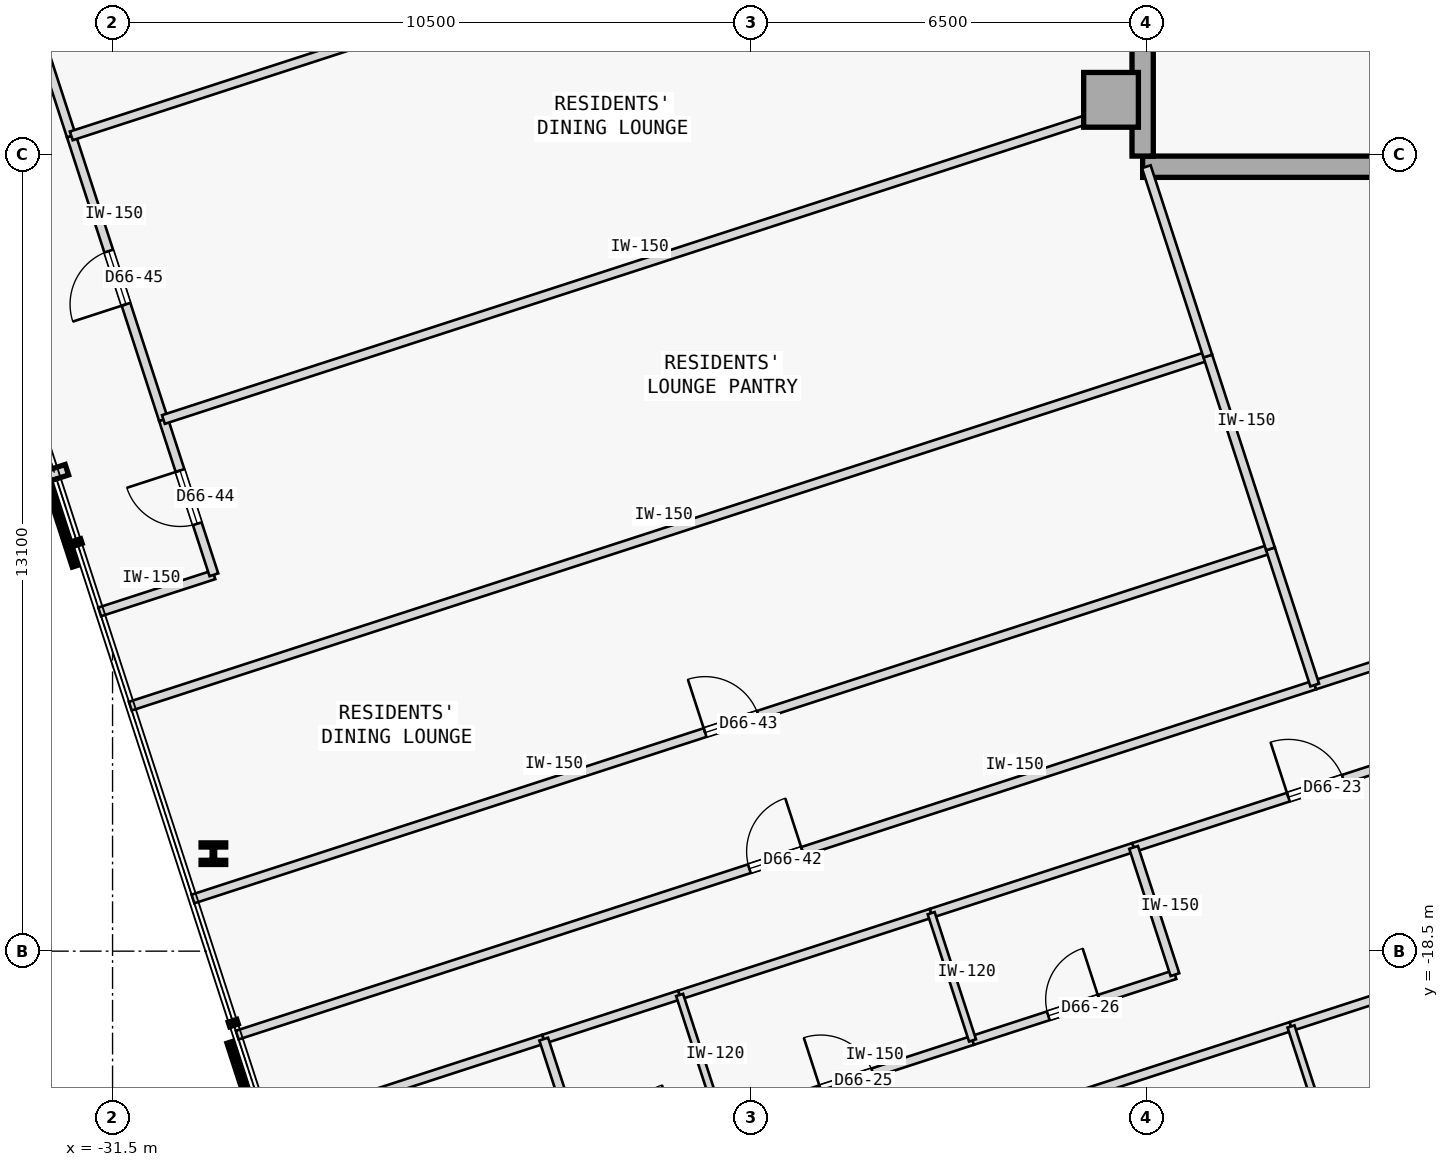
"""IFC4 building model, lengths in metres.
Left out: names, types, materials, properties, quantities, classifications, styles, units other than length and angle.
Written with IfcOpenShell. Run it as: python <this file> out.ifc"""

import sys

from ifc_helpers import new_model, si_unit, direction, frame, frame_2d, origin, origin_2d, place, context, subcontext, project, spatial, rectangle, i_section, extrude, element, fill, save


model = new_model("IFC4")
c1 = context("Model", 3, precision=1e-05, world=origin(), true_north=direction((0.0, 1.0)))
c2 = subcontext(c1, "Body", "Model", "MODEL_VIEW")
j1 = project(units=[si_unit("LENGTHUNIT", "METRE"), si_unit("PLANEANGLEUNIT", "RADIAN")], contexts=[c1])
p1 = place(None, origin())
s1 = spatial("IfcSite", under=j1, at=p1, CompositionType="ELEMENT")
p2 = place(p1, origin())
s2 = spatial("IfcBuilding", under=s1, at=p2, CompositionType="ELEMENT")
p3 = place(p2, frame((0.0, 0.0, 247.75)))
s3 = spatial("IfcBuildingStorey", under=s2, at=p3, CompositionType="ELEMENT", Elevation=247.75)
p4 = place(p3, frame((-15.08, -4.5, 0.0), z_axis=(0.0, 0.0, 1.0), x_axis=(1.0, 0.0, 0.0)))
e1 = element("IfcColumn", 1, at=p4, inside=s3, PredefinedType="COLUMN", context=c2, shape_type="SweptSolid", body=[
    extrude(rectangle(XDim=0.9, YDim=0.9, at=origin_2d()), origin(), (0.0, 0.0, 1.0), 3.35),
])
p5 = place(p3, frame((-14.56, -5.6, 0.0), z_axis=(0.0, 0.0, 1.0), x_axis=(1.0, 0.0, 0.0)))
e2 = element("IfcWall", 2, at=p5, inside=s3, PredefinedType="SHEAR", context=c2, shape_type="SweptSolid", body=[
    extrude(rectangle(XDim=10.86, YDim=0.35, at=frame_2d((5.43, 0.0))), origin(), (0.0, 0.0, 1.0), 3.125),
])
p6 = place(p3, frame((-14.56, -5.425, 0.0), z_axis=(0.0, 0.0, 1.0), x_axis=(0.0, 1.0, 0.0)))
e3 = element("IfcWall", 3, at=p6, inside=s3, PredefinedType="SHEAR", context=c2, shape_type="SweptSolid", body=[
    extrude(rectangle(XDim=10.85, YDim=0.35, at=frame_2d((5.425, 0.0))), origin(), (0.0, 0.0, 1.0), 3.125),
])
p7 = place(p3, frame((-29.842, -16.897, 0.0), z_axis=(0.0, 0.0, 1.0), x_axis=(1.0, 0.0, 0.0)))
e4 = element("IfcColumn", 4, at=p7, inside=s3, PredefinedType="COLUMN", context=c2, shape_type="SweptSolid", body=[
    extrude(i_section(OverallWidth=0.405, OverallDepth=0.355, WebThickness=0.042, FlangeThickness=0.068, FilletRadius=0.015, at=origin_2d()), origin(), (0.0, 0.0, 1.0), 3.35),
])
p8 = place(p3, frame((-28.95, -21.421, 0.0), z_axis=(0.0, 0.0, 1.0), x_axis=(0.951049476022, 0.309038661268, 0.0)))
e5 = element("IfcWall", 5, at=p8, inside=s3, PredefinedType="PARTITIONING", context=c2, shape_type="SweptSolid", body=[
    extrude(rectangle(XDim=4.774, YDim=0.15, at=frame_2d((2.387, 0.0))), origin(), (0.0, 0.0, 1.0), 3.125),
])
p9 = place(p3, frame((-14.709, -16.794, 0.0), z_axis=(0.0, 0.0, 1.0), x_axis=(0.951050295235, 0.309036140172, 0.0)))
e6 = element("IfcWall", 6, at=p9, inside=s3, PredefinedType="PARTITIONING", context=c2, shape_type="SweptSolid", body=[
    extrude(rectangle(XDim=6.302, YDim=0.15, at=frame_2d((3.151, 0.0))), origin(), (0.0, 0.0, 1.0), 3.125),
])
p10 = place(p9, frame((2.676, 0.0, 0.0)))
e7 = element("IfcOpeningElement", 7, at=p10, cuts=e6, PredefinedType="OPENING", context=c2, shape_type="SweptSolid", body=[
    extrude(rectangle(XDim=0.95, YDim=2.15, at=frame_2d((0.475, 1.075))), frame((0.0, 0.085, 0.0), z_axis=(0.0, -1.0, 0.0), x_axis=(1.0, 0.0, 0.0)), (0.0, 0.0, 1.0), 0.17),
])
p11 = place(p3, frame((-24.41, -19.946, 0.0), z_axis=(0.0, 0.0, 1.0), x_axis=(0.951076048914, 0.308956872689, 0.0)))
e8 = element("IfcWall", 8, at=p11, inside=s3, PredefinedType="PARTITIONING", context=c2, shape_type="SweptSolid", body=[
    extrude(rectangle(XDim=2.35, YDim=0.15, at=frame_2d((1.175, 0.0))), origin(), (0.0, 0.0, 1.0), 3.125),
])
p12 = place(p3, frame((-22.175, -19.22, 0.0), z_axis=(0.0, 0.0, 1.0), x_axis=(0.951052627573, 0.309028962374, 0.0)))
e9 = element("IfcWall", 9, at=p12, inside=s3, PredefinedType="PARTITIONING", context=c2, shape_type="SweptSolid", body=[
    extrude(rectangle(XDim=4.35, YDim=0.15, at=frame_2d((2.175, 0.0))), origin(), (0.0, 0.0, 1.0), 3.125),
])
p13 = place(p3, frame((-18.038, -17.876, 0.0), z_axis=(0.0, 0.0, 1.0), x_axis=(0.951062257173, 0.308999325213, 0.0)))
e10 = element("IfcWall", 10, at=p13, inside=s3, PredefinedType="PARTITIONING", context=c2, shape_type="SweptSolid", body=[
    extrude(rectangle(XDim=3.5, YDim=0.15, at=frame_2d((1.75, 0.0))), origin(), (0.0, 0.0, 1.0), 3.125),
])
p14 = place(p3, frame((-29.45, -19.881, 0.0), z_axis=(0.0, 0.0, 1.0), x_axis=(0.95105650271, 0.309017036186, 0.0)))
e11 = element("IfcWall", 11, at=p14, inside=s3, PredefinedType="PARTITIONING", context=c2, shape_type="SweptSolid", body=[
    extrude(rectangle(XDim=18.632, YDim=0.15, at=frame_2d((9.316, 0.0))), origin(), (0.0, 0.0, 1.0), 3.125),
])
p15 = place(p14, frame((8.856, 0.0, 0.0)))
e12 = element("IfcOpeningElement", 12, at=p15, cuts=e11, PredefinedType="OPENING", context=c2, shape_type="SweptSolid", body=[
    extrude(rectangle(XDim=0.92, YDim=2.15, at=frame_2d((0.46, 1.075))), frame((0.0, 0.085, 0.0), z_axis=(0.0, -1.0, 0.0), x_axis=(1.0, 0.0, 0.0)), (0.0, 0.0, 1.0), 0.17),
])
p16 = place(p3, frame((-31.712, -12.921, 0.0), z_axis=(0.0, 0.0, 1.0), x_axis=(0.951054051148, 0.309024581215, 0.0)))
e13 = element("IfcWall", 13, at=p16, inside=s3, PredefinedType="PARTITIONING", context=c2, shape_type="SweptSolid", body=[
    extrude(rectangle(XDim=1.975, YDim=0.15, at=frame_2d((0.988, 0.0))), origin(), (0.0, 0.0, 1.0), 3.125),
])
p17 = place(p3, frame((-29.833, -12.311, 0.0), z_axis=(0.0, 0.0, 1.0), x_axis=(-0.309044953986, 0.951047431213, 0.0)))
e14 = element("IfcWall", 14, at=p17, inside=s3, PredefinedType="PARTITIONING", context=c2, shape_type="SweptSolid", body=[
    extrude(rectangle(XDim=2.685, YDim=0.15, at=frame_2d((1.343, 0.0))), origin(), (0.0, 0.0, 1.0), 3.125),
])
p18 = place(p17, frame((0.883, 0.0, 0.0)))
e15 = element("IfcOpeningElement", 15, at=p18, cuts=e14, PredefinedType="OPENING", context=c2, shape_type="SweptSolid", body=[
    extrude(rectangle(XDim=0.92, YDim=2.15, at=frame_2d((0.46, 1.075))), frame((0.0, 0.085, 0.0), z_axis=(0.0, -1.0, 0.0), x_axis=(1.0, 0.0, 0.0)), (0.0, 0.0, 1.0), 0.17),
])
p19 = place(p3, frame((-30.663, -9.757, 0.0), z_axis=(0.0, 0.0, 1.0), x_axis=(-0.309019653166, 0.951055652397, 0.0)))
e16 = element("IfcWall", 16, at=p19, inside=s3, PredefinedType="PARTITIONING", context=c2, shape_type="SweptSolid", body=[
    extrude(rectangle(XDim=4.904, YDim=0.15, at=frame_2d((2.452, 0.0))), origin(), (0.0, 0.0, 1.0), 3.125),
])
p20 = place(p19, frame((1.992, 0.0, 0.0)))
e17 = element("IfcOpeningElement", 17, at=p20, cuts=e16, PredefinedType="OPENING", context=c2, shape_type="SweptSolid", body=[
    extrude(rectangle(XDim=0.92, YDim=2.15, at=frame_2d((0.46, 1.075))), frame((0.0, 0.085, 0.0), z_axis=(0.0, -1.0, 0.0), x_axis=(1.0, 0.0, 0.0)), (0.0, 0.0, 1.0), 0.17),
])
p21 = place(p3, frame((-32.179, -5.093, 0.0), z_axis=(0.0, 0.0, 1.0), x_axis=(-0.309014532869, 0.951057316083, 0.0)))
e18 = element("IfcWall", 18, at=p21, inside=s3, PredefinedType="PARTITIONING", context=c2, shape_type="SweptSolid", body=[
    extrude(rectangle(XDim=4.707, YDim=0.15, at=frame_2d((2.354, 0.0))), origin(), (0.0, 0.0, 1.0), 3.125),
])
p22 = place(p3, frame((-11.73, -14.123, 0.0), z_axis=(0.0, 0.0, 1.0), x_axis=(0.951052502763, 0.309029346483, 0.0)))
e19 = element("IfcWall", 19, at=p22, inside=s3, PredefinedType="PARTITIONING", context=c2, shape_type="SweptSolid", body=[
    extrude(rectangle(XDim=3.698, YDim=0.15, at=frame_2d((1.849, 0.0))), origin(), (0.0, 0.0, 1.0), 3.125),
])
p23 = place(p22, frame((1.389, 0.0, 0.0)))
e20 = element("IfcOpeningElement", 20, at=p23, cuts=e19, PredefinedType="OPENING", context=c2, shape_type="SweptSolid", body=[
    extrude(rectangle(XDim=0.92, YDim=2.15, at=frame_2d((0.46, 1.075))), frame((0.0, 0.085, 0.0), z_axis=(0.0, -1.0, 0.0), x_axis=(1.0, 0.0, 0.0)), (0.0, 0.0, 1.0), 0.17),
])
p24 = place(p3, frame((-23.73, -22.038, 0.0), z_axis=(0.0, 0.0, 1.0), x_axis=(-0.309060979314, 0.951042223598, 0.0)))
e21 = element("IfcWall", 21, at=p24, inside=s3, PredefinedType="PARTITIONING", context=c2, shape_type="SweptSolid", body=[
    extrude(rectangle(XDim=2.2, YDim=0.15, at=frame_2d((1.1, 0.0))), origin(), (0.0, 0.0, 1.0), 3.125),
])
p25 = place(p3, frame((-21.495, -21.312, 0.0), z_axis=(0.0, 0.0, 1.0), x_axis=(0.951057987102, 0.309012467661, 0.0)))
e22 = element("IfcWall", 22, at=p25, inside=s3, PredefinedType="PARTITIONING", context=c2, shape_type="SweptSolid", body=[
    extrude(rectangle(XDim=4.35, YDim=0.15, at=frame_2d((2.175, 0.0))), origin(), (0.0, 0.0, 1.0), 3.125),
])
p26 = place(p25, frame((1.725, 0.0, 0.0)))
e23 = element("IfcOpeningElement", 23, at=p26, cuts=e22, PredefinedType="OPENING", context=c2, shape_type="SweptSolid", body=[
    extrude(rectangle(XDim=0.9, YDim=2.15, at=frame_2d((0.45, 1.075))), frame((0.0, 0.085, 0.0), z_axis=(0.0, -1.0, 0.0), x_axis=(1.0, 0.0, 0.0)), (0.0, 0.0, 1.0), 0.17),
])
p27 = place(p3, frame((-17.358, -19.968, 0.0), z_axis=(0.0, 0.0, 1.0), x_axis=(0.951055596592, 0.309019824916, 0.0)))
e24 = element("IfcWall", 24, at=p27, inside=s3, PredefinedType="PARTITIONING", context=c2, shape_type="SweptSolid", body=[
    extrude(rectangle(XDim=3.5, YDim=0.15, at=frame_2d((1.75, 0.0))), origin(), (0.0, 0.0, 1.0), 3.125),
])
p28 = place(p27, frame((1.31, 0.0, 0.0)))
e25 = element("IfcOpeningElement", 25, at=p28, cuts=e24, PredefinedType="OPENING", context=c2, shape_type="SweptSolid", body=[
    extrude(rectangle(XDim=0.88, YDim=2.15, at=frame_2d((0.44, 1.075))), frame((0.0, 0.085, 0.0), z_axis=(0.0, -1.0, 0.0), x_axis=(1.0, 0.0, 0.0)), (0.0, 0.0, 1.0), 0.17),
])
p29 = place(p3, frame((-14.029, -18.886, 0.0), z_axis=(0.0, 0.0, 1.0), x_axis=(-0.308960600764, 0.951074837842, 0.0)))
e26 = element("IfcWall", 26, at=p29, inside=s3, PredefinedType="PARTITIONING", context=c2, shape_type="SweptSolid", body=[
    extrude(rectangle(XDim=2.2, YDim=0.15, at=frame_2d((1.1, 0.0))), origin(), (0.0, 0.0, 1.0), 3.125),
])
p30 = place(p3, frame((-16.543, -21.175, 0.0), z_axis=(0.0, 0.0, 1.0), x_axis=(0.951050272606, 0.309036209813, 0.0)))
e27 = element("IfcWall", 27, at=p30, inside=s3, PredefinedType="PARTITIONING", context=c2, shape_type="SweptSolid", body=[
    extrude(rectangle(XDim=4.65, YDim=0.15, at=frame_2d((2.325, 0.0))), origin(), (0.0, 0.0, 1.0), 3.125),
])
p31 = place(p3, frame((-12.12, -19.738, 0.0), z_axis=(0.0, 0.0, 1.0), x_axis=(0.951065702951, 0.308988719326, 0.0)))
e28 = element("IfcWall", 28, at=p31, inside=s3, PredefinedType="PARTITIONING", context=c2, shape_type="SweptSolid", body=[
    extrude(rectangle(XDim=4.65, YDim=0.15, at=frame_2d((2.325, 0.0))), origin(), (0.0, 0.0, 1.0), 3.125),
])
p32 = place(p31, frame((1.875, 0.0, 0.0)))
e29 = element("IfcOpeningElement", 29, at=p32, cuts=e28, PredefinedType="OPENING", context=c2, shape_type="SweptSolid", body=[
    extrude(rectangle(XDim=0.9, YDim=2.15, at=frame_2d((0.45, 1.075))), frame((0.0, 0.085, 0.0), z_axis=(0.0, -1.0, 0.0), x_axis=(1.0, 0.0, 0.0)), (0.0, 0.0, 1.0), 0.17),
])
for number, where, z_axis, x_axis in (
    (30, (-21.495, -21.312, 0.0), (0.0, 0.0, 1.0), (-0.309, 0.951, 0.0)),
    (31, (-17.358, -19.968, 0.0), (0.0, 0.0, 1.0), (-0.309, 0.951, 0.0)),
):
    element("IfcWall", number, at=place(p3, frame(where, z_axis=z_axis, x_axis=x_axis)), inside=s3, PredefinedType="PARTITIONING", context=c2, shape_type="SweptSolid", body=[
        extrude(rectangle(XDim=2.2, YDim=0.12, at=frame_2d((1.1, 0.0))), origin(), (0.0, 0.0, 1.0), 3.125),
    ])
p33 = place(p3, frame((-10.185, -25.694, 0.0), z_axis=(0.0, 0.0, 1.0), x_axis=(-0.309013782848, 0.951057559777, 0.0)))
e32 = element("IfcWall", 32, at=p33, inside=s3, PredefinedType="PARTITIONING", context=c2, shape_type="SweptSolid", body=[
    extrude(rectangle(XDim=6.262, YDim=0.12, at=frame_2d((3.131, 0.0))), origin(), (0.0, 0.0, 1.0), 3.125),
])
p34 = place(p3, frame((-30.178, -17.642, 0.0), z_axis=(0.0, 0.0, 1.0), x_axis=(0.95105650271, 0.309017036186, 0.0)))
e33 = element("IfcWall", 33, at=p34, inside=s3, PredefinedType="PARTITIONING", context=c2, shape_type="SweptSolid", body=[
    extrude(rectangle(XDim=18.632, YDim=0.15, at=frame_2d((9.316, 0.0))), origin(), (0.0, 0.0, 1.0), 3.125),
])
p35 = place(p34, frame((8.856, 0.0, 0.0)))
e34 = element("IfcOpeningElement", 34, at=p35, cuts=e33, PredefinedType="OPENING", context=c2, shape_type="SweptSolid", body=[
    extrude(rectangle(XDim=0.92, YDim=2.15, at=frame_2d((0.46, 1.075))), frame((0.0, 0.085, 0.0), z_axis=(0.0, -1.0, 0.0), x_axis=(1.0, 0.0, 0.0)), (0.0, 0.0, 1.0), 0.17),
])
p36 = place(p3, frame((-11.73, -14.123, 0.0), z_axis=(0.0, 0.0, 1.0), x_axis=(-0.309062621189, 0.951041690035, 0.0)))
e35 = element("IfcWall", 35, at=p36, inside=s3, PredefinedType="PARTITIONING", context=c2, shape_type="SweptSolid", body=[
    extrude(rectangle(XDim=2.354, YDim=0.15, at=frame_2d((1.177, 0.0))), origin(), (0.0, 0.0, 1.0), 3.125),
])
p37 = place(p3, frame((-31.208, -14.471, 0.0), z_axis=(0.0, 0.0, 1.0), x_axis=(0.951057753948, 0.309013185244, 0.0)))
e36 = element("IfcWall", 36, at=p37, inside=s3, PredefinedType="PARTITIONING", context=c2, shape_type="SweptSolid", body=[
    extrude(rectangle(XDim=18.632, YDim=0.15, at=frame_2d((9.316, 0.0))), origin(), (0.0, 0.0, 1.0), 3.125),
])
p38 = place(p3, frame((-12.458, -11.884, 0.0), z_axis=(0.0, 0.0, 1.0), x_axis=(-0.308946982245, 0.951079261766, 0.0)))
e37 = element("IfcWall", 37, at=p38, inside=s3, PredefinedType="PARTITIONING", context=c2, shape_type="SweptSolid", body=[
    extrude(rectangle(XDim=3.334, YDim=0.15, at=frame_2d((1.667, 0.0))), origin(), (0.0, 0.0, 1.0), 3.125),
])
p39 = place(p3, frame((-30.663, -9.757, 0.0), z_axis=(0.0, 0.0, 1.0), x_axis=(0.951058192995, 0.309011833974, 0.0)))
e38 = element("IfcWall", 38, at=p39, inside=s3, PredefinedType="PARTITIONING", context=c2, shape_type="SweptSolid", body=[
    extrude(rectangle(XDim=16.657, YDim=0.15, at=frame_2d((8.329, 0.0))), origin(), (0.0, 0.0, 1.0), 3.125),
])
p40 = place(p3, frame((-13.488, -8.713, 0.0), z_axis=(0.0, 0.0, 1.0), x_axis=(-0.309082700143, 0.951035164687, 0.0)))
e39 = element("IfcWall", 39, at=p40, inside=s3, PredefinedType="PARTITIONING", context=c2, shape_type="SweptSolid", body=[
    extrude(rectangle(XDim=3.274, YDim=0.15, at=frame_2d((1.637, 0.0))), origin(), (0.0, 0.0, 1.0), 3.125),
])
p41 = place(p3, frame((-32.179, -5.093, 0.0), z_axis=(0.0, 0.0, 1.0), x_axis=(0.951053885426, 0.309025091239, 0.0)))
e40 = element("IfcWall", 40, at=p41, inside=s3, PredefinedType="PARTITIONING", context=c2, shape_type="SweptSolid", body=[
    extrude(rectangle(XDim=16.657, YDim=0.15, at=frame_2d((8.329, 0.0))), origin(), (0.0, 0.0, 1.0), 3.125),
])
p42 = place(p10, origin())
e41 = element("IfcDoor", 41, at=p42, inside=s3, OperationType="SINGLE_SWING_LEFT", PredefinedType="DOOR", context=c2, shape_type="SweptSolid", body=[
    extrude(rectangle(XDim=0.95, YDim=2.15, at=frame_2d((0.475, 1.075))), frame((0.0, 0.025, 0.0), z_axis=(0.0, -1.0, 0.0), x_axis=(1.0, 0.0, 0.0)), (0.0, 0.0, 1.0), 0.05),
])
fill(e7, e41)
p43 = place(p26, origin())
e42 = element("IfcDoor", 42, at=p43, inside=s3, OperationType="SINGLE_SWING_LEFT", PredefinedType="DOOR", context=c2, shape_type="SweptSolid", body=[
    extrude(rectangle(XDim=0.9, YDim=2.15, at=frame_2d((0.45, 1.075))), frame((0.0, 0.025, 0.0), z_axis=(0.0, -1.0, 0.0), x_axis=(1.0, 0.0, 0.0)), (0.0, 0.0, 1.0), 0.05),
])
fill(e23, e42)
p44 = place(p28, origin())
e43 = element("IfcDoor", 43, at=p44, inside=s3, OperationType="SINGLE_SWING_RIGHT", PredefinedType="DOOR", context=c2, shape_type="SweptSolid", body=[
    extrude(rectangle(XDim=0.88, YDim=2.15, at=frame_2d((0.44, 1.075))), frame((0.0, 0.025, 0.0), z_axis=(0.0, -1.0, 0.0), x_axis=(1.0, 0.0, 0.0)), (0.0, 0.0, 1.0), 0.05),
])
fill(e25, e43)
p45 = place(p15, origin())
e44 = element("IfcDoor", 44, at=p45, inside=s3, OperationType="SINGLE_SWING_RIGHT", PredefinedType="DOOR", context=c2, shape_type="SweptSolid", body=[
    extrude(rectangle(XDim=0.92, YDim=2.15, at=frame_2d((0.46, 1.075))), frame((0.0, 0.025, 0.0), z_axis=(0.0, -1.0, 0.0), x_axis=(1.0, 0.0, 0.0)), (0.0, 0.0, 1.0), 0.05),
])
fill(e12, e44)
p46 = place(p35, origin())
e45 = element("IfcDoor", 45, at=p46, inside=s3, OperationType="SINGLE_SWING_LEFT", PredefinedType="DOOR", context=c2, shape_type="SweptSolid", body=[
    extrude(rectangle(XDim=0.92, YDim=2.15, at=frame_2d((0.46, 1.075))), frame((0.0, 0.025, 0.0), z_axis=(0.0, -1.0, 0.0), x_axis=(1.0, 0.0, 0.0)), (0.0, 0.0, 1.0), 0.05),
])
fill(e34, e45)
p47 = place(p18, origin())
e46 = element("IfcDoor", 46, at=p47, inside=s3, OperationType="SINGLE_SWING_RIGHT", PredefinedType="DOOR", context=c2, shape_type="SweptSolid", body=[
    extrude(rectangle(XDim=0.92, YDim=2.15, at=frame_2d((0.46, 1.075))), frame((0.0, 0.025, 0.0), z_axis=(0.0, -1.0, 0.0), x_axis=(1.0, 0.0, 0.0)), (0.0, 0.0, 1.0), 0.05),
])
fill(e15, e46)
p48 = place(p20, origin())
e47 = element("IfcDoor", 47, at=p48, inside=s3, OperationType="SINGLE_SWING_LEFT", PredefinedType="DOOR", context=c2, shape_type="SweptSolid", body=[
    extrude(rectangle(XDim=0.92, YDim=2.15, at=frame_2d((0.46, 1.075))), frame((0.0, 0.025, 0.0), z_axis=(0.0, -1.0, 0.0), x_axis=(1.0, 0.0, 0.0)), (0.0, 0.0, 1.0), 0.05),
])
fill(e17, e47)
save(model, sys.argv[1])
